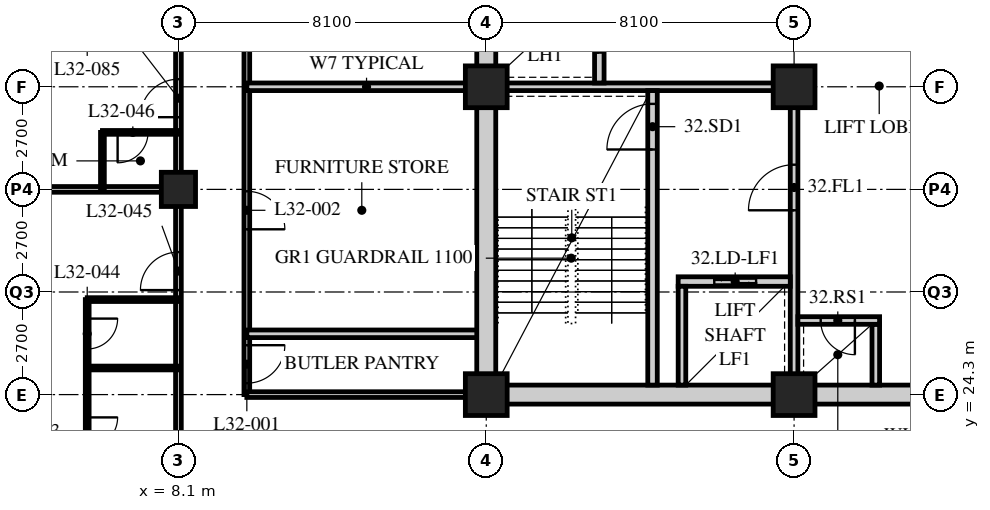
"""IFC4 building model, lengths in metres.
Left out: names, types, materials, properties, quantities, classifications, styles, units other than length and angle.
Written with IfcOpenShell. Run it as: python <this file> out.ifc"""

import sys

from ifc_helpers import new_model, si_unit, direction, frame, frame_2d, origin, origin_2d, place, context, subcontext, project, spatial, rectangle, hollow_rectangle, extrude, element, fill, save


model = new_model("IFC4")
c1 = context("Model", 3, precision=1e-05, world=origin(), true_north=direction((0.0, 1.0)))
c2 = subcontext(c1, "Body", "Model", "MODEL_VIEW")
j1 = project(units=[si_unit("LENGTHUNIT", "METRE"), si_unit("PLANEANGLEUNIT", "RADIAN")], contexts=[c1])
p1 = place(None, origin())
s1 = spatial("IfcSite", under=j1, at=p1, CompositionType="ELEMENT")
p2 = place(p1, origin())
s2 = spatial("IfcBuilding", under=s1, at=p2, CompositionType="ELEMENT")
p3 = place(p2, frame((0.0, 0.0, 127.2)))
s3 = spatial("IfcBuildingStorey", under=s2, at=p3, CompositionType="ELEMENT", Elevation=127.2)
p4 = place(p3, frame((8.1, 29.7, 0.0), z_axis=(0.0, 0.0, 1.0), x_axis=(1.0, 0.0, 0.0)))
e1 = element("IfcColumn", 1, at=p4, inside=s3, PredefinedType="COLUMN", context=c2, shape_type="SweptSolid", body=[
    extrude(hollow_rectangle(XDim=0.9, YDim=0.9, WallThickness=0.09, at=origin_2d()), origin(), (0.0, 0.0, 1.0), 3.4),
])
for number, where, z_axis, x_axis in (
    (2, (16.2, 24.3, 0.0), (0.0, 0.0, 1.0), (1.0, 0.0, 0.0)),
    (3, (16.2, 32.4, 0.0), (0.0, 0.0, 1.0), (1.0, 0.0, 0.0)),
    (4, (24.3, 24.3, 0.0), (0.0, 0.0, 1.0), (1.0, 0.0, 0.0)),
    (5, (24.3, 32.4, 0.0), (0.0, 0.0, 1.0), (1.0, 0.0, 0.0)),
):
    element("IfcColumn", number, at=place(p3, frame(where, z_axis=z_axis, x_axis=x_axis)), inside=s3, PredefinedType="COLUMN", context=c2, shape_type="SweptSolid", body=[
        extrude(hollow_rectangle(XDim=1.1, YDim=1.1, WallThickness=0.1, at=origin_2d()), origin(), (0.0, 0.0, 1.0), 3.4),
    ])
p5 = place(p3, frame((8.1, 21.6, 0.0), z_axis=(0.0, 0.0, 1.0), x_axis=(0.0, 1.0, 0.0)))
e6 = element("IfcWall", 6, at=p5, inside=s3, PredefinedType="PARTITIONING", context=c2, shape_type="SweptSolid", body=[
    extrude(rectangle(XDim=24.3, YDim=0.15, at=frame_2d((12.15, 0.0))), origin(), (0.0, 0.0, 1.0), 2.578),
])
p6 = place(p5, frame((5.45, 0.0, 0.0)))
e7 = element("IfcOpeningElement", 7, at=p6, cuts=e6, PredefinedType="OPENING", context=c2, shape_type="SweptSolid", body=[
    extrude(rectangle(XDim=1.0, YDim=2.1, at=frame_2d((0.5, 1.05))), frame((0.0, 0.085, 0.0), z_axis=(0.0, -1.0, 0.0), x_axis=(1.0, 0.0, 0.0)), (0.0, 0.0, 1.0), 0.17),
])
p7 = place(p5, frame((10.0, 0.0, 0.0)))
e8 = element("IfcOpeningElement", 8, at=p7, cuts=e6, PredefinedType="OPENING", context=c2, shape_type="SweptSolid", body=[
    extrude(rectangle(XDim=1.0, YDim=2.1, at=frame_2d((0.5, 1.05))), frame((0.0, 0.085, 0.0), z_axis=(0.0, -1.0, 0.0), x_axis=(1.0, 0.0, 0.0)), (0.0, 0.0, 1.0), 0.17),
])
p8 = place(p5, frame((21.65, 0.0, 0.0)))
e9 = element("IfcOpeningElement", 9, at=p8, cuts=e6, PredefinedType="OPENING", context=c2, shape_type="SweptSolid", body=[
    extrude(rectangle(XDim=1.0, YDim=2.1, at=frame_2d((0.5, 1.05))), frame((0.0, 0.085, 0.0), z_axis=(0.0, -1.0, 0.0), x_axis=(1.0, 0.0, 0.0)), (0.0, 0.0, 1.0), 0.17),
])
p9 = place(p3, frame((9.9, 44.1, 0.0), z_axis=(0.0, 0.0, 1.0), x_axis=(0.0, -1.0, 0.0)))
e10 = element("IfcWall", 10, at=p9, inside=s3, PredefinedType="PARTITIONING", context=c2, shape_type="SweptSolid", body=[
    extrude(rectangle(XDim=19.8, YDim=0.15, at=frame_2d((9.9, 0.0))), origin(), (0.0, 0.0, 1.0), 3.19),
])
p10 = place(p9, frame((18.5, 0.0, 0.0)))
e11 = element("IfcOpeningElement", 11, at=p10, cuts=e10, PredefinedType="OPENING", context=c2, shape_type="SweptSolid", body=[
    extrude(rectangle(XDim=1.0, YDim=2.1, at=frame_2d((0.5, 1.05))), frame((0.0, 0.085, 0.0), z_axis=(0.0, -1.0, 0.0), x_axis=(1.0, 0.0, 0.0)), (0.0, 0.0, 1.0), 0.17),
])
p11 = place(p9, frame((14.45, 0.0, 0.0)))
e12 = element("IfcOpeningElement", 12, at=p11, cuts=e10, PredefinedType="OPENING", context=c2, shape_type="SweptSolid", body=[
    extrude(rectangle(XDim=1.0, YDim=2.1, at=frame_2d((0.5, 1.05))), frame((0.0, 0.085, 0.0), z_axis=(0.0, -1.0, 0.0), x_axis=(1.0, 0.0, 0.0)), (0.0, 0.0, 1.0), 0.17),
])
p12 = place(p9, frame((7.15, 0.0, 0.0)))
e13 = element("IfcOpeningElement", 13, at=p12, cuts=e10, PredefinedType="OPENING", context=c2, shape_type="SweptSolid", body=[
    extrude(rectangle(XDim=1.0, YDim=2.1, at=frame_2d((0.5, 1.05))), frame((0.0, 0.085, 0.0), z_axis=(0.0, -1.0, 0.0), x_axis=(1.0, 0.0, 0.0)), (0.0, 0.0, 1.0), 0.17),
])
p13 = place(p3, frame((9.9, 24.3, 0.0), z_axis=(0.0, 0.0, 1.0), x_axis=(1.0, 0.0, 0.0)))
e14 = element("IfcWall", 14, at=p13, inside=s3, PredefinedType="PARTITIONING", context=c2, shape_type="SweptSolid", body=[
    extrude(rectangle(XDim=6.1, YDim=0.15, at=frame_2d((3.05, 0.0))), origin(), (0.0, 0.0, 1.0), 3.19),
])
for number, where, z_axis, x_axis in (
    (15, (9.9, 32.4, 0.0), (0.0, 0.0, 1.0), (1.0, 0.0, 0.0)),
    (16, (9.9, 25.9, 0.0), (0.0, 0.0, 1.0), (1.0, 0.0, 0.0)),
):
    element("IfcWall", number, at=place(p3, frame(where, z_axis=z_axis, x_axis=x_axis)), inside=s3, PredefinedType="SOLIDWALL", context=c2, shape_type="SweptSolid", body=[
        extrude(rectangle(XDim=6.3, YDim=0.2, at=frame_2d((3.15, 0.0))), origin(), (0.0, 0.0, 1.0), 3.19),
    ])
p14 = place(p3, frame((5.7, 21.6, 0.0), z_axis=(0.0, 0.0, 1.0), x_axis=(0.0, 1.0, 0.0)))
e17 = element("IfcWall", 17, at=p14, inside=s3, PredefinedType="PARTITIONING", context=c2, shape_type="SweptSolid", body=[
    extrude(rectangle(XDim=5.2, YDim=0.1, at=frame_2d((2.6, 0.0))), origin(), (0.0, 0.0, 1.0), 3.19),
])
p15 = place(p14, frame((1.3, 0.0, 0.0)))
e18 = element("IfcOpeningElement", 18, at=p15, cuts=e17, PredefinedType="OPENING", context=c2, shape_type="SweptSolid", body=[
    extrude(rectangle(XDim=0.8, YDim=2.1, at=frame_2d((0.4, 1.05))), frame((0.0, 0.06, 0.0), z_axis=(0.0, -1.0, 0.0), x_axis=(1.0, 0.0, 0.0)), (0.0, 0.0, 1.0), 0.12),
])
p16 = place(p14, frame((3.9, 0.0, 0.0)))
e19 = element("IfcOpeningElement", 19, at=p16, cuts=e17, PredefinedType="OPENING", context=c2, shape_type="SweptSolid", body=[
    extrude(rectangle(XDim=0.8, YDim=2.1, at=frame_2d((0.4, 1.05))), frame((0.0, 0.06, 0.0), z_axis=(0.0, -1.0, 0.0), x_axis=(1.0, 0.0, 0.0)), (0.0, 0.0, 1.0), 0.12),
])
for number, where, z_axis, x_axis in (
    (20, (8.1, 25.0, 0.0), (0.0, 0.0, 1.0), (-1.0, 0.0, 0.0)),
    (21, (8.1, 26.8, 0.0), (0.0, 0.0, 1.0), (-1.0, 0.0, 0.0)),
):
    element("IfcWall", number, at=place(p3, frame(where, z_axis=z_axis, x_axis=x_axis)), inside=s3, PredefinedType="PARTITIONING", context=c2, shape_type="SweptSolid", body=[
        extrude(rectangle(XDim=2.4, YDim=0.1, at=frame_2d((1.2, 0.0))), origin(), (0.0, 0.0, 1.0), 3.19),
    ])
p17 = place(p3, frame((8.1, 29.7, 0.0), z_axis=(0.0, 0.0, 1.0), x_axis=(-1.0, 0.0, 0.0)))
e22 = element("IfcWall", 22, at=p17, inside=s3, PredefinedType="PARTITIONING", context=c2, shape_type="SweptSolid", body=[
    extrude(rectangle(XDim=7.8, YDim=0.15, at=frame_2d((3.9, 0.0))), origin(), (0.0, 0.0, 1.0), 2.578),
])
p18 = place(p3, frame((6.1, 29.7, 0.0), z_axis=(0.0, 0.0, 1.0), x_axis=(0.0, 1.0, 0.0)))
e23 = element("IfcWall", 23, at=p18, inside=s3, PredefinedType="PARTITIONING", context=c2, shape_type="SweptSolid", body=[
    extrude(rectangle(XDim=1.5, YDim=0.1, at=frame_2d((0.75, 0.0))), origin(), (0.0, 0.0, 1.0), 3.19),
])
p19 = place(p3, frame((8.1, 31.2, 0.0), z_axis=(0.0, 0.0, 1.0), x_axis=(-1.0, 0.0, 0.0)))
e24 = element("IfcWall", 24, at=p19, inside=s3, PredefinedType="PARTITIONING", context=c2, shape_type="SweptSolid", body=[
    extrude(rectangle(XDim=2.0, YDim=0.1, at=frame_2d((1.0, 0.0))), origin(), (0.0, 0.0, 1.0), 3.19),
])
p20 = place(p19, frame((0.8, 0.0, 0.0)))
e25 = element("IfcOpeningElement", 25, at=p20, cuts=e24, PredefinedType="OPENING", context=c2, shape_type="SweptSolid", body=[
    extrude(rectangle(XDim=0.8, YDim=2.1, at=frame_2d((0.4, 1.05))), frame((0.0, 0.06, 0.0), z_axis=(0.0, -1.0, 0.0), x_axis=(1.0, 0.0, 0.0)), (0.0, 0.0, 1.0), 0.12),
])
p21 = place(p3, frame((15.95, 24.3, 0.0), z_axis=(0.0, 0.0, 1.0), x_axis=(1.0, 0.0, 0.0)))
e26 = element("IfcWall", 26, at=p21, inside=s3, PredefinedType="SOLIDWALL", context=c2, shape_type="SweptSolid", body=[
    extrude(rectangle(XDim=24.8, YDim=0.5, at=frame_2d((12.4, 0.0))), origin(), (0.0, 0.0, 1.0), 2.54),
])
p22 = place(p21, frame((11.5, 0.0, 0.0)))
e27 = element("IfcOpeningElement", 27, at=p22, cuts=e26, PredefinedType="OPENING", context=c2, shape_type="SweptSolid", body=[
    extrude(rectangle(XDim=1.8, YDim=2.4, at=frame_2d((0.9, 1.2))), frame((0.0, 0.26, 0.0), z_axis=(0.0, -1.0, 0.0), x_axis=(1.0, 0.0, 0.0)), (0.0, 0.0, 1.0), 0.52),
])
p23 = place(p3, frame((16.2, 24.55, 0.0), z_axis=(0.0, 0.0, 1.0), x_axis=(0.0, 1.0, 0.0)))
e28 = element("IfcWall", 28, at=p23, inside=s3, PredefinedType="SOLIDWALL", context=c2, shape_type="SweptSolid", body=[
    extrude(rectangle(XDim=15.7, YDim=0.5, at=frame_2d((7.85, 0.0))), origin(), (0.0, 0.0, 1.0), 2.578),
])
p24 = place(p3, frame((16.45, 32.4, 0.0), z_axis=(0.0, 0.0, 1.0), x_axis=(1.0, 0.0, 0.0)))
e29 = element("IfcWall", 29, at=p24, inside=s3, PredefinedType="SOLIDWALL", context=c2, shape_type="SweptSolid", body=[
    extrude(rectangle(XDim=7.95, YDim=0.2, at=frame_2d((3.975, 0.0))), origin(), (0.0, 0.0, 1.0), 2.578),
])
p25 = place(p3, frame((24.3, 24.55, 0.0), z_axis=(0.0, 0.0, 1.0), x_axis=(0.0, 1.0, 0.0)))
e30 = element("IfcWall", 30, at=p25, inside=s3, PredefinedType="SOLIDWALL", context=c2, shape_type="SweptSolid", body=[
    extrude(rectangle(XDim=7.75, YDim=0.2, at=frame_2d((3.875, 0.0))), origin(), (0.0, 0.0, 1.0), 2.578),
])
p26 = place(p25, frame((4.6, 0.0, 0.0)))
e31 = element("IfcOpeningElement", 31, at=p26, cuts=e30, PredefinedType="OPENING", context=c2, shape_type="SweptSolid", body=[
    extrude(rectangle(XDim=1.2, YDim=2.1, at=frame_2d((0.6, 1.05))), frame((0.0, 0.11, 0.0), z_axis=(0.0, -1.0, 0.0), x_axis=(1.0, 0.0, 0.0)), (0.0, 0.0, 1.0), 0.22),
])
p27 = place(p3, frame((20.575, 24.55, 0.0), z_axis=(0.0, 0.0, 1.0), x_axis=(0.0, 1.0, 0.0)))
e32 = element("IfcWall", 32, at=p27, inside=s3, PredefinedType="SOLIDWALL", context=c2, shape_type="SweptSolid", body=[
    extrude(rectangle(XDim=7.75, YDim=0.25, at=frame_2d((3.875, 0.0))), origin(), (0.0, 0.0, 1.0), 3.19),
])
p28 = place(p27, frame((6.2, 0.0, 0.0)))
e33 = element("IfcOpeningElement", 33, at=p28, cuts=e32, PredefinedType="OPENING", context=c2, shape_type="SweptSolid", body=[
    extrude(rectangle(XDim=1.2, YDim=2.1, at=frame_2d((0.6, 1.05))), frame((0.0, 0.135, 0.0), z_axis=(0.0, -1.0, 0.0), x_axis=(1.0, 0.0, 0.0)), (0.0, 0.0, 1.0), 0.27),
])
p29 = place(p3, frame((21.25, 27.275, 0.0), z_axis=(0.0, 0.0, 1.0), x_axis=(1.0, 0.0, 0.0)))
e34 = element("IfcWall", 34, at=p29, inside=s3, PredefinedType="SOLIDWALL", context=c2, shape_type="SweptSolid", body=[
    extrude(rectangle(XDim=2.95, YDim=0.25, at=frame_2d((1.475, 0.0))), origin(), (0.0, 0.0, 1.0), 3.19),
])
p30 = place(p29, frame((0.95, 0.0, 0.0)))
e35 = element("IfcOpeningElement", 35, at=p30, cuts=e34, PredefinedType="OPENING", context=c2, shape_type="SweptSolid", body=[
    extrude(rectangle(XDim=1.1, YDim=2.4, at=frame_2d((0.55, 1.2))), frame((0.0, 0.135, 0.0), z_axis=(0.0, -1.0, 0.0), x_axis=(1.0, 0.0, 0.0)), (0.0, 0.0, 1.0), 0.27),
])
p31 = place(p3, frame((21.35, 24.55, 0.0), z_axis=(0.0, 0.0, 1.0), x_axis=(0.0, 1.0, 0.0)))
e36 = element("IfcWall", 36, at=p31, inside=s3, PredefinedType="SOLIDWALL", context=c2, shape_type="SweptSolid", body=[
    extrude(rectangle(XDim=2.6, YDim=0.2, at=frame_2d((1.3, 0.0))), origin(), (0.0, 0.0, 1.0), 3.19),
])
p32 = place(p3, frame((19.175, 32.5, 0.0), z_axis=(0.0, 0.0, 1.0), x_axis=(0.0, 1.0, 0.0)))
e37 = element("IfcWall", 37, at=p32, inside=s3, PredefinedType="SOLIDWALL", context=c2, shape_type="SweptSolid", body=[
    extrude(rectangle(XDim=7.75, YDim=0.25, at=frame_2d((3.875, 0.0))), origin(), (0.0, 0.0, 1.0), 3.19),
])
p33 = place(p32, frame((0.8, 0.0, 0.0)))
e38 = element("IfcOpeningElement", 38, at=p33, cuts=e37, PredefinedType="OPENING", context=c2, shape_type="SweptSolid", body=[
    extrude(rectangle(XDim=1.1, YDim=2.4, at=frame_2d((0.55, 1.2))), frame((0.0, 0.135, 0.0), z_axis=(0.0, -1.0, 0.0), x_axis=(1.0, 0.0, 0.0)), (0.0, 0.0, 1.0), 0.27),
])
p34 = place(p32, frame((3.4, 0.0, 0.0)))
e39 = element("IfcOpeningElement", 39, at=p34, cuts=e37, PredefinedType="OPENING", context=c2, shape_type="SweptSolid", body=[
    extrude(rectangle(XDim=1.1, YDim=2.4, at=frame_2d((0.55, 1.2))), frame((0.0, 0.135, 0.0), z_axis=(0.0, -1.0, 0.0), x_axis=(1.0, 0.0, 0.0)), (0.0, 0.0, 1.0), 0.27),
])
p35 = place(p32, frame((6.0, 0.0, 0.0)))
e40 = element("IfcOpeningElement", 40, at=p35, cuts=e37, PredefinedType="OPENING", context=c2, shape_type="SweptSolid", body=[
    extrude(rectangle(XDim=1.1, YDim=2.4, at=frame_2d((0.55, 1.2))), frame((0.0, 0.135, 0.0), z_axis=(0.0, -1.0, 0.0), x_axis=(1.0, 0.0, 0.0)), (0.0, 0.0, 1.0), 0.27),
])
p36 = place(p3, frame((26.45, 24.55, 0.0), z_axis=(0.0, 0.0, 1.0), x_axis=(0.0, 1.0, 0.0)))
e41 = element("IfcWall", 41, at=p36, inside=s3, PredefinedType="SOLIDWALL", context=c2, shape_type="SweptSolid", body=[
    extrude(rectangle(XDim=1.6, YDim=0.2, at=frame_2d((0.8, 0.0))), origin(), (0.0, 0.0, 1.0), 3.19),
])
p37 = place(p3, frame((24.4, 26.25, 0.0), z_axis=(0.0, 0.0, 1.0), x_axis=(1.0, 0.0, 0.0)))
e42 = element("IfcWall", 42, at=p37, inside=s3, PredefinedType="SOLIDWALL", context=c2, shape_type="SweptSolid", body=[
    extrude(rectangle(XDim=2.15, YDim=0.2, at=frame_2d((1.075, 0.0))), origin(), (0.0, 0.0, 1.0), 3.19),
])
p38 = place(p37, frame((0.6, 0.0, 0.0)))
e43 = element("IfcOpeningElement", 43, at=p38, cuts=e42, PredefinedType="OPENING", context=c2, shape_type="SweptSolid", body=[
    extrude(rectangle(XDim=0.9, YDim=2.1, at=frame_2d((0.45, 1.05))), frame((0.0, 0.11, 0.0), z_axis=(0.0, -1.0, 0.0), x_axis=(1.0, 0.0, 0.0)), (0.0, 0.0, 1.0), 0.22),
])
p39 = place(p10, origin())
e44 = element("IfcDoor", 44, at=p39, inside=s3, OperationType="SINGLE_SWING_LEFT", PredefinedType="DOOR", context=c2, shape_type="SweptSolid", body=[
    extrude(rectangle(XDim=1.0, YDim=2.1, at=frame_2d((0.5, 1.05))), frame((0.0, 0.025, 0.0), z_axis=(0.0, -1.0, 0.0), x_axis=(1.0, 0.0, 0.0)), (0.0, 0.0, 1.0), 0.05),
])
fill(e11, e44)
p40 = place(p11, origin())
e45 = element("IfcDoor", 45, at=p40, inside=s3, OperationType="SINGLE_SWING_RIGHT", PredefinedType="DOOR", context=c2, shape_type="SweptSolid", body=[
    extrude(rectangle(XDim=1.0, YDim=2.1, at=frame_2d((0.5, 1.05))), frame((0.0, 0.025, 0.0), z_axis=(0.0, -1.0, 0.0), x_axis=(1.0, 0.0, 0.0)), (0.0, 0.0, 1.0), 0.05),
])
fill(e12, e45)
p41 = place(p15, origin())
e46 = element("IfcDoor", 46, at=p41, inside=s3, OperationType="SINGLE_SWING_LEFT", PredefinedType="DOOR", context=c2, shape_type="SweptSolid", body=[
    extrude(rectangle(XDim=0.8, YDim=2.1, at=frame_2d((0.4, 1.05))), frame((0.0, 0.025, 0.0), z_axis=(0.0, -1.0, 0.0), x_axis=(1.0, 0.0, 0.0)), (0.0, 0.0, 1.0), 0.05),
])
fill(e18, e46)
p42 = place(p16, origin())
e47 = element("IfcDoor", 47, at=p42, inside=s3, OperationType="SINGLE_SWING_LEFT", PredefinedType="DOOR", context=c2, shape_type="SweptSolid", body=[
    extrude(rectangle(XDim=0.8, YDim=2.1, at=frame_2d((0.4, 1.05))), frame((0.0, 0.025, 0.0), z_axis=(0.0, -1.0, 0.0), x_axis=(1.0, 0.0, 0.0)), (0.0, 0.0, 1.0), 0.05),
])
fill(e19, e47)
p43 = place(p6, origin())
e48 = element("IfcDoor", 48, at=p43, inside=s3, OperationType="SINGLE_SWING_LEFT", PredefinedType="DOOR", context=c2, shape_type="SweptSolid", body=[
    extrude(rectangle(XDim=1.0, YDim=2.1, at=frame_2d((0.5, 1.05))), frame((0.0, 0.025, 0.0), z_axis=(0.0, -1.0, 0.0), x_axis=(1.0, 0.0, 0.0)), (0.0, 0.0, 1.0), 0.05),
])
fill(e7, e48)
p44 = place(p20, origin())
e49 = element("IfcDoor", 49, at=p44, inside=s3, OperationType="SINGLE_SWING_RIGHT", PredefinedType="DOOR", context=c2, shape_type="SweptSolid", body=[
    extrude(rectangle(XDim=0.8, YDim=2.1, at=frame_2d((0.4, 1.05))), frame((0.0, 0.025, 0.0), z_axis=(0.0, -1.0, 0.0), x_axis=(1.0, 0.0, 0.0)), (0.0, 0.0, 1.0), 0.05),
])
fill(e25, e49)
p45 = place(p7, origin())
e50 = element("IfcDoor", 50, at=p45, inside=s3, OperationType="SINGLE_SWING_LEFT", PredefinedType="DOOR", context=c2, shape_type="SweptSolid", body=[
    extrude(rectangle(XDim=1.0, YDim=2.1, at=frame_2d((0.5, 1.05))), frame((0.0, 0.025, 0.0), z_axis=(0.0, -1.0, 0.0), x_axis=(1.0, 0.0, 0.0)), (0.0, 0.0, 1.0), 0.05),
])
fill(e8, e50)
p46 = place(p28, origin())
e51 = element("IfcDoor", 51, at=p46, inside=s3, OperationType="SINGLE_SWING_LEFT", PredefinedType="DOOR", context=c2, shape_type="SweptSolid", body=[
    extrude(rectangle(XDim=1.2, YDim=2.1, at=frame_2d((0.6, 1.05))), frame((0.0, 0.025, 0.0), z_axis=(0.0, -1.0, 0.0), x_axis=(1.0, 0.0, 0.0)), (0.0, 0.0, 1.0), 0.05),
])
fill(e33, e51)
p47 = place(p26, origin())
e52 = element("IfcDoor", 52, at=p47, inside=s3, OperationType="SINGLE_SWING_LEFT", PredefinedType="DOOR", context=c2, shape_type="SweptSolid", body=[
    extrude(rectangle(XDim=1.2, YDim=2.1, at=frame_2d((0.6, 1.05))), frame((0.0, 0.025, 0.0), z_axis=(0.0, -1.0, 0.0), x_axis=(1.0, 0.0, 0.0)), (0.0, 0.0, 1.0), 0.05),
])
fill(e31, e52)
p48 = place(p38, origin())
e53 = element("IfcDoor", 53, at=p48, inside=s3, OperationType="SINGLE_SWING_LEFT", PredefinedType="DOOR", context=c2, shape_type="SweptSolid", body=[
    extrude(rectangle(XDim=0.9, YDim=2.1, at=frame_2d((0.45, 1.05))), frame((0.0, 0.025, 0.0), z_axis=(0.0, -1.0, 0.0), x_axis=(1.0, 0.0, 0.0)), (0.0, 0.0, 1.0), 0.05),
])
fill(e43, e53)
p49 = place(p33, origin())
e54 = element("IfcDoor", 54, at=p49, inside=s3, OperationType="DOUBLE_DOOR_SLIDING", PredefinedType="DOOR", context=c2, shape_type="SweptSolid", body=[
    extrude(rectangle(XDim=1.1, YDim=2.4, at=frame_2d((0.55, 1.2))), frame((0.0, 0.025, 0.0), z_axis=(0.0, -1.0, 0.0), x_axis=(1.0, 0.0, 0.0)), (0.0, 0.0, 1.0), 0.05),
])
fill(e38, e54)
p50 = place(p30, origin())
e55 = element("IfcDoor", 55, at=p50, inside=s3, OperationType="DOUBLE_DOOR_SLIDING", PredefinedType="DOOR", context=c2, shape_type="SweptSolid", body=[
    extrude(rectangle(XDim=1.1, YDim=2.4, at=frame_2d((0.55, 1.2))), frame((0.0, 0.025, 0.0), z_axis=(0.0, -1.0, 0.0), x_axis=(1.0, 0.0, 0.0)), (0.0, 0.0, 1.0), 0.05),
])
fill(e35, e55)
save(model, sys.argv[1])
